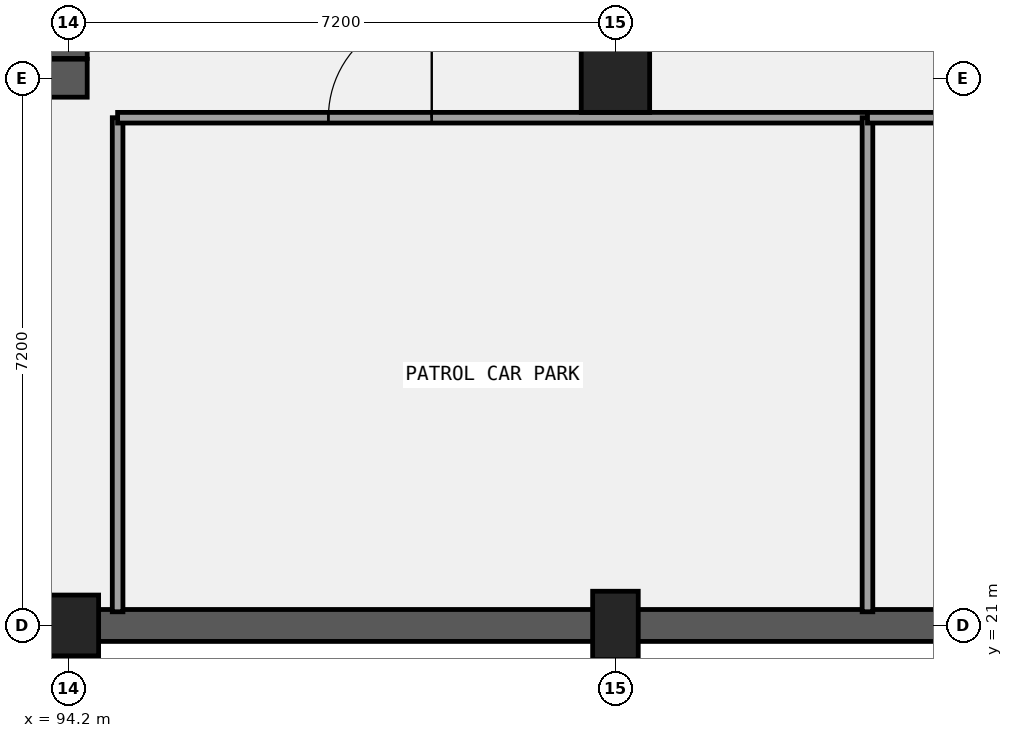
"""IFC4 building model, lengths in metres.
Left out: names, types, materials, properties, quantities, classifications, styles, units other than length and angle.
Written with IfcOpenShell. Run it as: python <this file> out.ifc"""

import sys

from ifc_helpers import new_model, si_unit, direction, frame, frame_2d, origin, origin_2d, place, context, subcontext, project, spatial, rectangle, extrude, element, fill, save


model = new_model("IFC4")
c1 = context("Model", 3, precision=1e-05, world=origin(), true_north=direction((0.0, 1.0)))
c2 = subcontext(c1, "Body", "Model", "MODEL_VIEW")
j1 = project(units=[si_unit("LENGTHUNIT", "METRE"), si_unit("PLANEANGLEUNIT", "RADIAN")], contexts=[c1])
p1 = place(None, origin())
s1 = spatial("IfcSite", under=j1, at=p1, CompositionType="ELEMENT")
p2 = place(p1, origin())
s2 = spatial("IfcBuilding", under=s1, at=p2, CompositionType="ELEMENT")
p3 = place(p2, frame((0.0, 0.0, -4.2)))
s3 = spatial("IfcBuildingStorey", under=s2, at=p3, CompositionType="ELEMENT", Elevation=-4.2)
p4 = place(p3, frame((144.81, 21.0, 0.0), z_axis=(0.0, 0.0, 1.0), x_axis=(-1.0, 0.0, 0.0)))
e1 = element("IfcWall", 1, at=p4, inside=s3, PredefinedType="USERDEFINED", context=c2, shape_type="SweptSolid", body=[
    extrude(rectangle(XDim=115.62, YDim=0.42, at=frame_2d((57.81, 0.0))), origin(), (0.0, 0.0, 1.0), 2.88),
])
p5 = place(p3, frame((79.55, 28.2, 0.0), z_axis=(0.0, 0.0, 1.0), x_axis=(1.0, 0.0, 0.0)))
e2 = element("IfcWall", 2, at=p5, inside=s3, PredefinedType="SHEAR", context=c2, shape_type="SweptSolid", body=[
    extrude(rectangle(XDim=14.9, YDim=0.5, at=frame_2d((7.45, 0.0))), origin(), (0.0, 0.0, 1.0), 4.2),
])
p6 = place(p5, frame((3.8, 0.0, 0.0)))
e3 = element("IfcOpeningElement", 3, at=p6, cuts=e2, PredefinedType="OPENING", context=c2, shape_type="SweptSolid", body=[
    extrude(rectangle(XDim=1.3, YDim=2.2, at=frame_2d((0.65, 1.1))), frame((0.0, 0.26, 0.0), z_axis=(0.0, -1.0, 0.0), x_axis=(1.0, 0.0, 0.0)), (0.0, 0.0, 1.0), 0.52),
])
p7 = place(p3, frame((94.2, 28.46, 0.0), z_axis=(0.0, 0.0, 1.0), x_axis=(0.0, 1.0, 0.0)))
e4 = element("IfcWall", 4, at=p7, inside=s3, PredefinedType="SHEAR", context=c2, shape_type="SweptSolid", body=[
    extrude(rectangle(XDim=6.68, YDim=0.5, at=frame_2d((3.34, 0.0))), origin(), (0.0, 0.0, 1.0), 4.2),
])
p8 = place(p3, frame((94.2, 21.0, 0.0), z_axis=(0.0, 0.0, 1.0), x_axis=(1.0, 0.0, 0.0)))
e5 = element("IfcColumn", 5, at=p8, inside=s3, PredefinedType="COLUMN", context=c2, shape_type="SweptSolid", body=[
    extrude(rectangle(XDim=0.8, YDim=0.8, at=origin_2d()), origin(), (0.0, 0.0, 1.0), 4.2),
])
p9 = place(p3, frame((101.4, 21.0, 0.0), z_axis=(0.0, 0.0, 1.0), x_axis=(1.0, 0.0, 0.0)))
e6 = element("IfcColumn", 6, at=p9, inside=s3, PredefinedType="COLUMN", context=c2, shape_type="SweptSolid", body=[
    extrude(rectangle(XDim=0.6, YDim=0.9, at=origin_2d()), origin(), (0.0, 0.0, 1.0), 4.2),
])
p10 = place(p3, frame((101.4, 28.2, 0.0), z_axis=(0.0, 0.0, 1.0), x_axis=(1.0, 0.0, 0.0)))
e7 = element("IfcColumn", 7, at=p10, inside=s3, PredefinedType="COLUMN", context=c2, shape_type="SweptSolid", body=[
    extrude(rectangle(XDim=0.9, YDim=0.9, at=origin_2d()), origin(), (0.0, 0.0, 1.0), 4.2),
])
p11 = place(p3, frame((94.85, 21.18, 0.0), z_axis=(0.0, 0.0, 1.0), x_axis=(0.0, 1.0, 0.0)))
e8 = element("IfcWall", 8, at=p11, inside=s3, PredefinedType="PARTITIONING", context=c2, shape_type="SweptSolid", body=[
    extrude(rectangle(XDim=6.5, YDim=0.14, at=frame_2d((3.25, 0.0))), origin(), (0.0, 0.0, 1.0), 3.88),
])
p12 = place(p3, frame((94.85, 27.68, 0.0), z_axis=(0.0, 0.0, 1.0), x_axis=(1.0, 0.0, 0.0)))
e9 = element("IfcWall", 9, at=p12, inside=s3, PredefinedType="PARTITIONING", context=c2, shape_type="SweptSolid", body=[
    extrude(rectangle(XDim=9.866, YDim=0.14, at=frame_2d((4.933, 0.0))), origin(), (0.0, 0.0, 1.0), 3.88),
])
p13 = place(p12, frame((2.773, 0.0, 0.0)))
e10 = element("IfcOpeningElement", 10, at=p13, cuts=e9, PredefinedType="OPENING", context=c2, shape_type="SweptSolid", body=[
    extrude(rectangle(XDim=1.36, YDim=2.22, at=frame_2d((0.68, 1.11))), frame((0.0, 0.08, 0.0), z_axis=(0.0, -1.0, 0.0), x_axis=(1.0, 0.0, 0.0)), (0.0, 0.0, 1.0), 0.16),
])
p14 = place(p3, frame((104.716, 21.18, 0.0), z_axis=(0.0, 0.0, 1.0), x_axis=(0.0, 1.0, 0.0)))
e11 = element("IfcWall", 11, at=p14, inside=s3, PredefinedType="PARTITIONING", context=c2, shape_type="SweptSolid", body=[
    extrude(rectangle(XDim=6.5, YDim=0.14, at=frame_2d((3.25, 0.0))), origin(), (0.0, 0.0, 1.0), 3.88),
])
p15 = place(p3, frame((104.716, 27.68, 0.0), z_axis=(0.0, 0.0, 1.0), x_axis=(1.0, 0.0, 0.0)))
e12 = element("IfcWall", 12, at=p15, inside=s3, PredefinedType="PARTITIONING", context=c2, shape_type="SweptSolid", body=[
    extrude(rectangle(XDim=9.866, YDim=0.14, at=frame_2d((4.933, 0.0))), origin(), (0.0, 0.0, 1.0), 3.88),
])
p16 = place(p15, frame((5.733, 0.0, 0.0)))
e13 = element("IfcOpeningElement", 13, at=p16, cuts=e12, PredefinedType="OPENING", context=c2, shape_type="SweptSolid", body=[
    extrude(rectangle(XDim=1.36, YDim=2.35, at=frame_2d((0.68, 1.175))), frame((0.0, 0.08, 0.0), z_axis=(0.0, -1.0, 0.0), x_axis=(1.0, 0.0, 0.0)), (0.0, 0.0, 1.0), 0.16),
])
p17 = place(p13, frame((1.36, 0.0, 0.0), z_axis=(0.0, 0.0, 1.0), x_axis=(-1.0, 0.0, 0.0)))
e14 = element("IfcDoor", 14, at=p17, inside=s3, OperationType="SINGLE_SWING_RIGHT", PredefinedType="DOOR", context=c2, shape_type="SweptSolid", body=[
    extrude(rectangle(XDim=1.36, YDim=2.22, at=frame_2d((0.68, 1.11))), frame((0.0, 0.025, 0.0), z_axis=(0.0, -1.0, 0.0), x_axis=(1.0, 0.0, 0.0)), (0.0, 0.0, 1.0), 0.05),
])
fill(e10, e14)
save(model, sys.argv[1])
